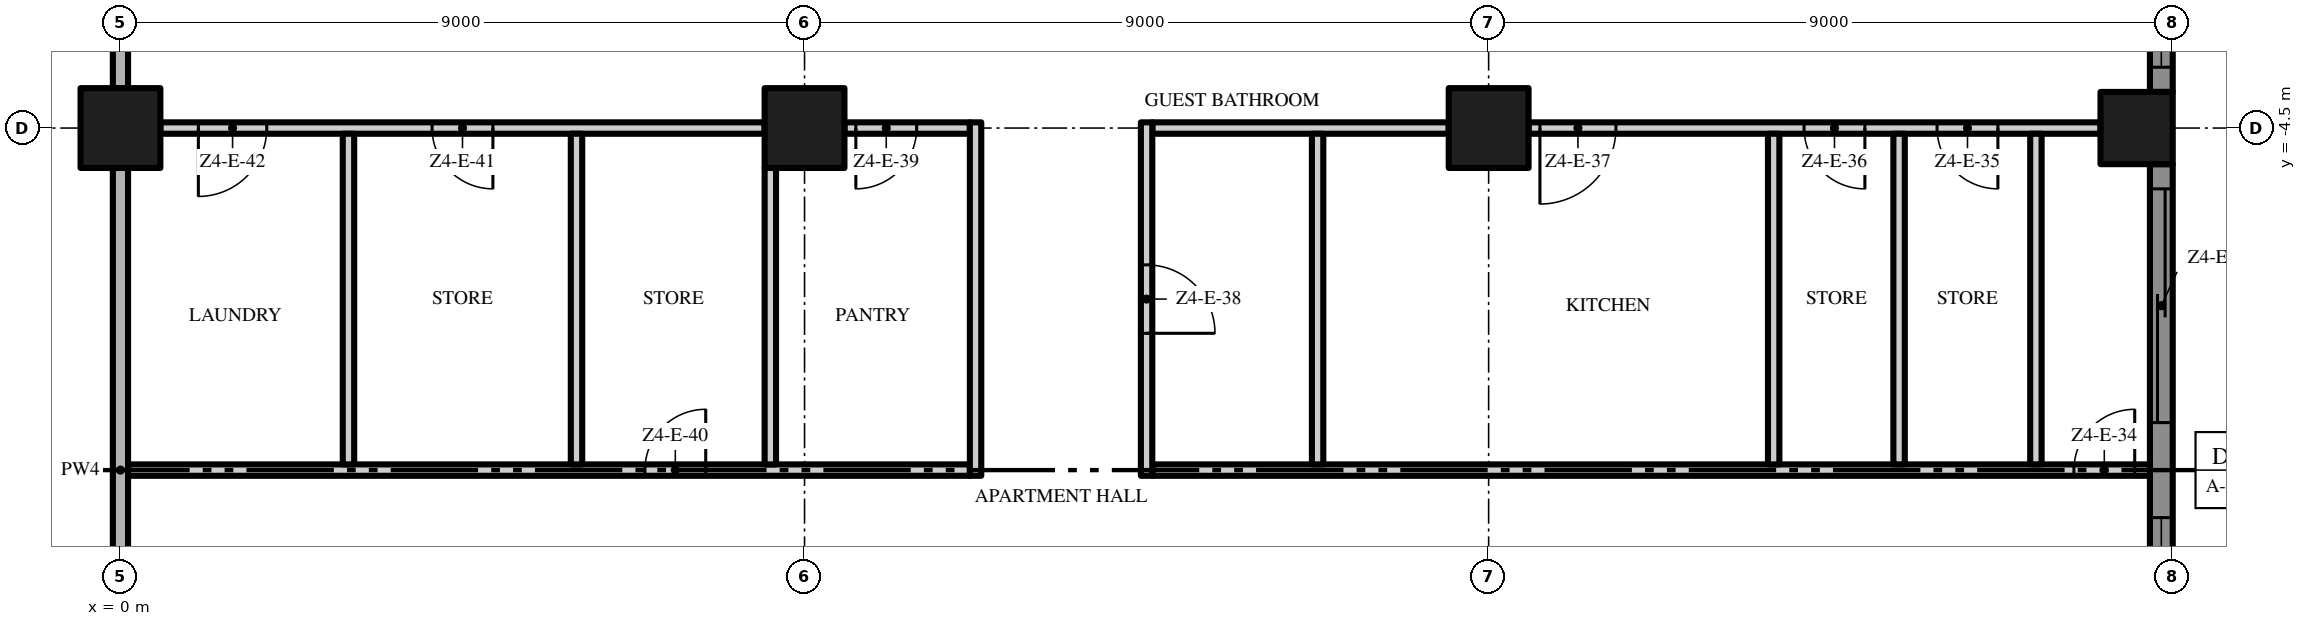
"""IFC4 building model, lengths in metres.
Left out: names, types, materials, properties, quantities, classifications, styles, units other than length and angle.
Written with IfcOpenShell. Run it as: python <this file> out.ifc"""

import sys

from ifc_helpers import new_model, si_unit, direction, frame, frame_2d, origin, origin_2d, place, context, subcontext, project, spatial, polyline, rectangle, outline, extrude, element, fill, save


model = new_model("IFC4")
c1 = context("Model", 3, precision=1e-05, world=origin(), true_north=direction((0.0, 1.0)))
c2 = subcontext(c1, "Body", "Model", "MODEL_VIEW")
j1 = project(units=[si_unit("LENGTHUNIT", "METRE"), si_unit("PLANEANGLEUNIT", "RADIAN")], contexts=[c1])
p1 = place(None, origin())
s1 = spatial("IfcSite", under=j1, at=p1, CompositionType="ELEMENT")
p2 = place(p1, origin())
s2 = spatial("IfcBuilding", under=s1, at=p2, CompositionType="ELEMENT")
p3 = place(p2, frame((0.0, 0.0, 226.2)))
s3 = spatial("IfcBuildingStorey", under=s2, at=p3, CompositionType="ELEMENT", Elevation=226.2)
for number, where, z_axis, x_axis in (
    (1, (0.0, -4.5, 0.0), (0.0, 0.0, 1.0), (1.0, 0.0, 0.0)),
    (2, (18.0, -4.5, 0.0), (0.0, 0.0, 1.0), (1.0, 0.0, 0.0)),
):
    element("IfcColumn", number, at=place(p3, frame(where, z_axis=z_axis, x_axis=x_axis)), inside=s3, PredefinedType="COLUMN", context=c2, shape_type="SweptSolid", body=[
        extrude(rectangle(XDim=1.05, YDim=1.05, at=origin_2d()), origin(), (0.0, 0.0, 1.0), 3.5),
    ])
p4 = place(p3, frame((26.525, -4.5, 0.0), z_axis=(0.0, 0.0, 1.0), x_axis=(1.0, 0.0, 0.0)))
e3 = element("IfcColumn", 3, at=p4, inside=s3, PredefinedType="COLUMN", context=c2, shape_type="SweptSolid", body=[
    extrude(rectangle(XDim=0.95, YDim=0.95, at=origin_2d()), origin(), (0.0, 0.0, 1.0), 3.5),
])
p5 = place(p3, frame((9.0, -4.5, 0.0), z_axis=(0.0, 0.0, 1.0), x_axis=(1.0, 0.0, 0.0)))
e4 = element("IfcColumn", 4, at=p5, inside=s3, PredefinedType="COLUMN", context=c2, shape_type="SweptSolid", body=[
    extrude(rectangle(XDim=1.05, YDim=1.05, at=origin_2d()), origin(), (0.0, 0.0, 1.0), 3.5),
])
p6 = place(p3, frame((26.85, -4.975, 0.0), z_axis=(0.0, 0.0, 1.0), x_axis=(0.0, -1.0, 0.0)))
e5 = element("IfcWall", 5, at=p6, inside=s3, PredefinedType="SOLIDWALL", context=c2, shape_type="SweptSolid", body=[
    extrude(rectangle(XDim=8.05, YDim=0.3, at=frame_2d((4.025, 0.0))), origin(), (0.0, 0.0, 1.0), 3.5),
])
p7 = place(p6, frame((4.65, 0.0, 0.45)))
e6 = element("IfcOpeningElement", 6, at=p7, cuts=e5, PredefinedType="OPENING", context=c2, shape_type="SweptSolid", body=[
    extrude(rectangle(XDim=3.075, YDim=2.65, at=frame_2d((1.538, 1.325))), frame((0.0, 0.16, 0.0), z_axis=(0.0, -1.0, 0.0), x_axis=(1.0, 0.0, 0.0)), (0.0, 0.0, 1.0), 0.32),
])
p8 = place(p6, frame((0.325, 0.0, 0.0)))
e7 = element("IfcOpeningElement", 7, at=p8, cuts=e5, PredefinedType="OPENING", context=c2, shape_type="SweptSolid", body=[
    extrude(rectangle(XDim=3.075, YDim=2.4, at=frame_2d((1.538, 1.2))), frame((0.0, 0.16, 0.0), z_axis=(0.0, -1.0, 0.0), x_axis=(1.0, 0.0, 0.0)), (0.0, 0.0, 1.0), 0.32),
])
p9 = place(p3, frame((26.85, 4.025, 0.0), z_axis=(0.0, 0.0, 1.0), x_axis=(0.0, -1.0, 0.0)))
e8 = element("IfcWall", 8, at=p9, inside=s3, PredefinedType="SOLIDWALL", context=c2, shape_type="SweptSolid", body=[
    extrude(rectangle(XDim=8.05, YDim=0.3, at=frame_2d((4.025, 0.0))), origin(), (0.0, 0.0, 1.0), 3.5),
])
p10 = place(p9, frame((4.65, 0.0, 0.45)))
e9 = element("IfcOpeningElement", 9, at=p10, cuts=e8, PredefinedType="OPENING", context=c2, shape_type="SweptSolid", body=[
    extrude(rectangle(XDim=3.075, YDim=2.65, at=frame_2d((1.538, 1.325))), frame((0.0, 0.16, 0.0), z_axis=(0.0, -1.0, 0.0), x_axis=(1.0, 0.0, 0.0)), (0.0, 0.0, 1.0), 0.32),
])
p11 = place(p9, frame((0.325, 0.0, 0.45)))
e10 = element("IfcOpeningElement", 10, at=p11, cuts=e8, PredefinedType="OPENING", context=c2, shape_type="SweptSolid", body=[
    extrude(rectangle(XDim=3.075, YDim=2.65, at=frame_2d((1.538, 1.325))), frame((0.0, 0.16, 0.0), z_axis=(0.0, -1.0, 0.0), x_axis=(1.0, 0.0, 0.0)), (0.0, 0.0, 1.0), 0.32),
])
p12 = place(p3, origin())
e11 = element("IfcWall", 11, at=p12, inside=s3, PredefinedType="USERDEFINED", context=c2, shape_type="SweptSolid", body=[
    extrude(outline(polyline([(28.8, -18.0), (28.095, -16.5), (27.659, -15.0), (27.6, -14.25), (27.659, -13.5), (28.095, -12.0), (28.8, -10.5), (29.505, -9.0), (29.941, -7.5), (30.0, -6.75), (29.941, -6.0), (29.505, -4.5), (28.8, -3.0), (28.095, -1.5), (27.659, 0.0), (27.6, 0.75), (27.659, 1.5), (28.095, 3.0), (28.8, 4.5), (29.505, 6.0), (29.941, 7.5), (30.0, 8.25), (29.941, 9.0), (29.505, 10.5), (28.8, 12.0), (28.095, 13.5), (27.659, 15.0), (27.6, 15.75), (27.659, 16.5), (28.095, 18.0), (27.855, 18.07), (27.411, 16.545), (27.349, 15.75), (27.411, 14.955), (27.86, 13.411), (28.574, 11.894), (29.271, 10.411), (29.694, 8.955), (29.749, 8.25), (29.694, 7.545), (29.271, 6.089), (28.574, 4.606), (27.86, 3.089), (27.411, 1.545), (27.349, 0.75), (27.411, -0.045), (27.86, -1.589), (28.574, -3.106), (29.271, -4.589), (29.694, -6.045), (29.749, -6.75), (29.694, -7.455), (29.271, -8.911), (28.574, -10.394), (27.86, -11.911), (27.411, -13.455), (27.349, -14.25), (27.411, -15.045), (27.86, -16.589), (28.574, -18.106), (28.8, -18.0)])), origin(), (0.0, 0.0, 1.0), 0.9),
])
p13 = place(p3, frame((0.1, -9.0, 0.0), z_axis=(0.0, 0.0, 1.0), x_axis=(1.0, 0.0, 0.0)))
e12 = element("IfcWall", 12, at=p13, inside=s3, PredefinedType="PARTITIONING", context=c2, shape_type="SweptSolid", body=[
    extrude(rectangle(XDim=11.075, YDim=0.15, at=frame_2d((5.537, 0.0))), origin(), (0.0, 0.0, 1.0), 3.5),
])
p14 = place(p13, frame((6.8, 0.0, 0.0)))
e13 = element("IfcOpeningElement", 13, at=p14, cuts=e12, PredefinedType="OPENING", context=c2, shape_type="SweptSolid", body=[
    extrude(rectangle(XDim=0.8, YDim=2.0, at=frame_2d((0.4, 1.0))), frame((0.0, 0.085, 0.0), z_axis=(0.0, -1.0, 0.0), x_axis=(1.0, 0.0, 0.0)), (0.0, 0.0, 1.0), 0.17),
])
p15 = place(p3, frame((13.575, -9.0, 0.0), z_axis=(0.0, 0.0, 1.0), x_axis=(1.0, 0.0, 0.0)))
e14 = element("IfcWall", 14, at=p15, inside=s3, PredefinedType="PARTITIONING", context=c2, shape_type="SweptSolid", body=[
    extrude(rectangle(XDim=13.125, YDim=0.15, at=frame_2d((6.562, 0.0))), origin(), (0.0, 0.0, 1.0), 3.5),
])
p16 = place(p15, frame((12.125, 0.0, 0.0)))
e15 = element("IfcOpeningElement", 15, at=p16, cuts=e14, PredefinedType="OPENING", context=c2, shape_type="SweptSolid", body=[
    extrude(rectangle(XDim=0.8, YDim=2.0, at=frame_2d((0.4, 1.0))), frame((0.0, 0.085, 0.0), z_axis=(0.0, -1.0, 0.0), x_axis=(1.0, 0.0, 0.0)), (0.0, 0.0, 1.0), 0.17),
])
p17 = place(p3, frame((8.475, -4.5, 0.0), z_axis=(0.0, 0.0, 1.0), x_axis=(-1.0, 0.0, 0.0)))
e16 = element("IfcWall", 16, at=p17, inside=s3, PredefinedType="PARTITIONING", context=c2, shape_type="SweptSolid", body=[
    extrude(rectangle(XDim=7.95, YDim=0.15, at=frame_2d((3.975, 0.0))), origin(), (0.0, 0.0, 1.0), 3.5),
])
p18 = place(p17, frame((3.575, 0.0, 0.0)))
e17 = element("IfcOpeningElement", 17, at=p18, cuts=e16, PredefinedType="OPENING", context=c2, shape_type="SweptSolid", body=[
    extrude(rectangle(XDim=0.8, YDim=2.0, at=frame_2d((0.4, 1.0))), frame((0.0, 0.085, 0.0), z_axis=(0.0, -1.0, 0.0), x_axis=(1.0, 0.0, 0.0)), (0.0, 0.0, 1.0), 0.17),
])
p19 = place(p17, frame((6.55, 0.0, 0.0)))
e18 = element("IfcOpeningElement", 18, at=p19, cuts=e16, PredefinedType="OPENING", context=c2, shape_type="SweptSolid", body=[
    extrude(rectangle(XDim=0.9, YDim=2.1, at=frame_2d((0.45, 1.05))), frame((0.0, 0.085, 0.0), z_axis=(0.0, -1.0, 0.0), x_axis=(1.0, 0.0, 0.0)), (0.0, 0.0, 1.0), 0.17),
])
p20 = place(p3, frame((11.175, -4.5, 0.0), z_axis=(0.0, 0.0, 1.0), x_axis=(-1.0, 0.0, 0.0)))
e19 = element("IfcWall", 19, at=p20, inside=s3, PredefinedType="PARTITIONING", context=c2, shape_type="SweptSolid", body=[
    extrude(rectangle(XDim=1.65, YDim=0.15, at=frame_2d((0.825, 0.0))), origin(), (0.0, 0.0, 1.0), 3.5),
])
p21 = place(p20, frame((0.7, 0.0, 0.0)))
e20 = element("IfcOpeningElement", 20, at=p21, cuts=e19, PredefinedType="OPENING", context=c2, shape_type="SweptSolid", body=[
    extrude(rectangle(XDim=0.8, YDim=2.0, at=frame_2d((0.4, 1.0))), frame((0.0, 0.085, 0.0), z_axis=(0.0, -1.0, 0.0), x_axis=(1.0, 0.0, 0.0)), (0.0, 0.0, 1.0), 0.17),
])
p22 = place(p3, frame((13.575, -4.5, 0.0), z_axis=(0.0, 0.0, 1.0), x_axis=(1.0, 0.0, 0.0)))
e21 = element("IfcWall", 21, at=p22, inside=s3, PredefinedType="PARTITIONING", context=c2, shape_type="SweptSolid", body=[
    extrude(rectangle(XDim=3.9, YDim=0.15, at=frame_2d((1.95, 0.0))), origin(), (0.0, 0.0, 1.0), 3.5),
])
p23 = place(p3, frame((26.05, -4.5, 0.0), z_axis=(0.0, 0.0, 1.0), x_axis=(-1.0, 0.0, 0.0)))
e22 = element("IfcWall", 22, at=p23, inside=s3, PredefinedType="PARTITIONING", context=c2, shape_type="SweptSolid", body=[
    extrude(rectangle(XDim=7.525, YDim=0.15, at=frame_2d((3.763, 0.0))), origin(), (0.0, 0.0, 1.0), 3.5),
])
p24 = place(p23, frame((1.35, 0.0, 0.0)))
e23 = element("IfcOpeningElement", 23, at=p24, cuts=e22, PredefinedType="OPENING", context=c2, shape_type="SweptSolid", body=[
    extrude(rectangle(XDim=0.8, YDim=2.0, at=frame_2d((0.4, 1.0))), frame((0.0, 0.085, 0.0), z_axis=(0.0, -1.0, 0.0), x_axis=(1.0, 0.0, 0.0)), (0.0, 0.0, 1.0), 0.17),
])
p25 = place(p23, frame((3.1, 0.0, 0.0)))
e24 = element("IfcOpeningElement", 24, at=p25, cuts=e22, PredefinedType="OPENING", context=c2, shape_type="SweptSolid", body=[
    extrude(rectangle(XDim=0.8, YDim=2.0, at=frame_2d((0.4, 1.0))), frame((0.0, 0.085, 0.0), z_axis=(0.0, -1.0, 0.0), x_axis=(1.0, 0.0, 0.0)), (0.0, 0.0, 1.0), 0.17),
])
p26 = place(p23, frame((6.375, 0.0, 0.0)))
e25 = element("IfcOpeningElement", 25, at=p26, cuts=e22, PredefinedType="OPENING", context=c2, shape_type="SweptSolid", body=[
    extrude(rectangle(XDim=1.0, YDim=2.4, at=frame_2d((0.5, 1.2))), frame((0.0, 0.085, 0.0), z_axis=(0.0, -1.0, 0.0), x_axis=(1.0, 0.0, 0.0)), (0.0, 0.0, 1.0), 0.17),
])
p27 = place(p3, frame((0.0, -12.975, 0.0), z_axis=(0.0, 0.0, 1.0), x_axis=(0.0, 1.0, 0.0)))
e26 = element("IfcWall", 26, at=p27, inside=s3, PredefinedType="PARTITIONING", context=c2, shape_type="SweptSolid", body=[
    extrude(rectangle(XDim=7.95, YDim=0.2, at=frame_2d((3.975, 0.0))), origin(), (0.0, 0.0, 1.0), 3.5),
])
p28 = place(p3, frame((0.0, -3.975, 0.0), z_axis=(0.0, 0.0, 1.0), x_axis=(0.0, 1.0, 0.0)))
e27 = element("IfcWall", 27, at=p28, inside=s3, PredefinedType="PARTITIONING", context=c2, shape_type="SweptSolid", body=[
    extrude(rectangle(XDim=4.075, YDim=0.2, at=frame_2d((2.038, 0.0))), origin(), (0.0, 0.0, 1.0), 3.5),
])
for number, where, z_axis, x_axis in (
    (28, (3.0, -8.925, 0.0), (0.0, 0.0, 1.0), (0.0, 1.0, 0.0)),
    (29, (6.0, -8.925, 0.0), (0.0, 0.0, 1.0), (0.0, 1.0, 0.0)),
):
    element("IfcWall", number, at=place(p3, frame(where, z_axis=z_axis, x_axis=x_axis)), inside=s3, PredefinedType="PARTITIONING", context=c2, shape_type="SweptSolid", body=[
        extrude(rectangle(XDim=4.35, YDim=0.15, at=frame_2d((2.175, 0.0))), origin(), (0.0, 0.0, 1.0), 3.5),
    ])
p29 = place(p3, frame((8.55, -8.925, 0.0), z_axis=(0.0, 0.0, 1.0), x_axis=(0.0, 1.0, 0.0)))
e30 = element("IfcWall", 30, at=p29, inside=s3, PredefinedType="PARTITIONING", context=c2, shape_type="SweptSolid", body=[
    extrude(rectangle(XDim=3.9, YDim=0.15, at=frame_2d((1.95, 0.0))), origin(), (0.0, 0.0, 1.0), 3.5),
])
p30 = place(p3, frame((11.25, -9.075, 0.0), z_axis=(0.0, 0.0, 1.0), x_axis=(0.0, 1.0, 0.0)))
e31 = element("IfcWall", 31, at=p30, inside=s3, PredefinedType="PARTITIONING", context=c2, shape_type="SweptSolid", body=[
    extrude(rectangle(XDim=4.65, YDim=0.15, at=frame_2d((2.325, 0.0))), origin(), (0.0, 0.0, 1.0), 3.5),
])
p31 = place(p3, frame((13.5, -4.425, 0.0), z_axis=(0.0, 0.0, 1.0), x_axis=(0.0, -1.0, 0.0)))
e32 = element("IfcWall", 32, at=p31, inside=s3, PredefinedType="PARTITIONING", context=c2, shape_type="SweptSolid", body=[
    extrude(rectangle(XDim=4.65, YDim=0.15, at=frame_2d((2.325, 0.0))), origin(), (0.0, 0.0, 1.0), 3.5),
])
p32 = place(p31, frame((1.875, 0.0, 0.0)))
e33 = element("IfcOpeningElement", 33, at=p32, cuts=e32, PredefinedType="OPENING", context=c2, shape_type="SweptSolid", body=[
    extrude(rectangle(XDim=0.9, YDim=2.1, at=frame_2d((0.45, 1.05))), frame((0.0, 0.085, 0.0), z_axis=(0.0, -1.0, 0.0), x_axis=(1.0, 0.0, 0.0)), (0.0, 0.0, 1.0), 0.17),
])
for number, where, z_axis, x_axis in (
    (34, (15.75, -8.925, 0.0), (0.0, 0.0, 1.0), (0.0, 1.0, 0.0)),
    (35, (21.75, -8.925, 0.0), (0.0, 0.0, 1.0), (0.0, 1.0, 0.0)),
    (36, (23.4, -8.925, 0.0), (0.0, 0.0, 1.0), (0.0, 1.0, 0.0)),
    (37, (25.2, -8.925, 0.0), (0.0, 0.0, 1.0), (0.0, 1.0, 0.0)),
):
    element("IfcWall", number, at=place(p3, frame(where, z_axis=z_axis, x_axis=x_axis)), inside=s3, PredefinedType="PARTITIONING", context=c2, shape_type="SweptSolid", body=[
        extrude(rectangle(XDim=4.35, YDim=0.15, at=frame_2d((2.175, 0.0))), origin(), (0.0, 0.0, 1.0), 3.5),
    ])
p33 = place(p7, origin())
e38 = element("IfcWindow", 38, at=p33, inside=s3, PartitioningType="SINGLE_PANEL", PredefinedType="WINDOW", context=c2, shape_type="SweptSolid", body=[
    extrude(rectangle(XDim=3.075, YDim=2.65, at=frame_2d((1.538, 1.325))), frame((0.0, 0.03, 0.0), z_axis=(0.0, -1.0, 0.0), x_axis=(1.0, 0.0, 0.0)), (0.0, 0.0, 1.0), 0.06),
])
fill(e6, e38)
p34 = place(p8, origin())
e39 = element("IfcDoor", 39, at=p34, inside=s3, OperationType="SINGLE_SWING_LEFT", PredefinedType="DOOR", context=c2, shape_type="SweptSolid", body=[
    extrude(rectangle(XDim=3.075, YDim=2.4, at=frame_2d((1.538, 1.2))), frame((0.0, 0.025, 0.0), z_axis=(0.0, -1.0, 0.0), x_axis=(1.0, 0.0, 0.0)), (0.0, 0.0, 1.0), 0.05),
])
fill(e7, e39)
p35 = place(p10, origin())
e40 = element("IfcWindow", 40, at=p35, inside=s3, PartitioningType="SINGLE_PANEL", PredefinedType="WINDOW", context=c2, shape_type="SweptSolid", body=[
    extrude(rectangle(XDim=3.075, YDim=2.65, at=frame_2d((1.538, 1.325))), frame((0.0, 0.03, 0.0), z_axis=(0.0, -1.0, 0.0), x_axis=(1.0, 0.0, 0.0)), (0.0, 0.0, 1.0), 0.06),
])
fill(e9, e40)
p36 = place(p16, origin())
e41 = element("IfcDoor", 41, at=p36, inside=s3, OperationType="SINGLE_SWING_RIGHT", PredefinedType="DOOR", context=c2, shape_type="SweptSolid", body=[
    extrude(rectangle(XDim=0.8, YDim=2.0, at=frame_2d((0.4, 1.0))), frame((0.0, 0.025, 0.0), z_axis=(0.0, -1.0, 0.0), x_axis=(1.0, 0.0, 0.0)), (0.0, 0.0, 1.0), 0.05),
])
fill(e15, e41)
p37 = place(p24, origin())
e42 = element("IfcDoor", 42, at=p37, inside=s3, OperationType="SINGLE_SWING_LEFT", PredefinedType="DOOR", context=c2, shape_type="SweptSolid", body=[
    extrude(rectangle(XDim=0.8, YDim=2.0, at=frame_2d((0.4, 1.0))), frame((0.0, 0.025, 0.0), z_axis=(0.0, -1.0, 0.0), x_axis=(1.0, 0.0, 0.0)), (0.0, 0.0, 1.0), 0.05),
])
fill(e23, e42)
p38 = place(p25, origin())
e43 = element("IfcDoor", 43, at=p38, inside=s3, OperationType="SINGLE_SWING_LEFT", PredefinedType="DOOR", context=c2, shape_type="SweptSolid", body=[
    extrude(rectangle(XDim=0.8, YDim=2.0, at=frame_2d((0.4, 1.0))), frame((0.0, 0.025, 0.0), z_axis=(0.0, -1.0, 0.0), x_axis=(1.0, 0.0, 0.0)), (0.0, 0.0, 1.0), 0.05),
])
fill(e24, e43)
p39 = place(p26, origin())
e44 = element("IfcDoor", 44, at=p39, inside=s3, OperationType="SINGLE_SWING_RIGHT", PredefinedType="DOOR", context=c2, shape_type="SweptSolid", body=[
    extrude(rectangle(XDim=1.0, YDim=2.4, at=frame_2d((0.5, 1.2))), frame((0.0, 0.025, 0.0), z_axis=(0.0, -1.0, 0.0), x_axis=(1.0, 0.0, 0.0)), (0.0, 0.0, 1.0), 0.05),
])
fill(e25, e44)
p40 = place(p32, origin())
e45 = element("IfcDoor", 45, at=p40, inside=s3, OperationType="SINGLE_SWING_RIGHT", PredefinedType="DOOR", context=c2, shape_type="SweptSolid", body=[
    extrude(rectangle(XDim=0.9, YDim=2.1, at=frame_2d((0.45, 1.05))), frame((0.0, 0.025, 0.0), z_axis=(0.0, -1.0, 0.0), x_axis=(1.0, 0.0, 0.0)), (0.0, 0.0, 1.0), 0.05),
])
fill(e33, e45)
p41 = place(p21, origin())
e46 = element("IfcDoor", 46, at=p41, inside=s3, OperationType="SINGLE_SWING_RIGHT", PredefinedType="DOOR", context=c2, shape_type="SweptSolid", body=[
    extrude(rectangle(XDim=0.8, YDim=2.0, at=frame_2d((0.4, 1.0))), frame((0.0, 0.025, 0.0), z_axis=(0.0, -1.0, 0.0), x_axis=(1.0, 0.0, 0.0)), (0.0, 0.0, 1.0), 0.05),
])
fill(e20, e46)
p42 = place(p14, origin())
e47 = element("IfcDoor", 47, at=p42, inside=s3, OperationType="SINGLE_SWING_RIGHT", PredefinedType="DOOR", context=c2, shape_type="SweptSolid", body=[
    extrude(rectangle(XDim=0.8, YDim=2.0, at=frame_2d((0.4, 1.0))), frame((0.0, 0.025, 0.0), z_axis=(0.0, -1.0, 0.0), x_axis=(1.0, 0.0, 0.0)), (0.0, 0.0, 1.0), 0.05),
])
fill(e13, e47)
p43 = place(p18, origin())
e48 = element("IfcDoor", 48, at=p43, inside=s3, OperationType="SINGLE_SWING_LEFT", PredefinedType="DOOR", context=c2, shape_type="SweptSolid", body=[
    extrude(rectangle(XDim=0.8, YDim=2.0, at=frame_2d((0.4, 1.0))), frame((0.0, 0.025, 0.0), z_axis=(0.0, -1.0, 0.0), x_axis=(1.0, 0.0, 0.0)), (0.0, 0.0, 1.0), 0.05),
])
fill(e17, e48)
p44 = place(p19, origin())
e49 = element("IfcDoor", 49, at=p44, inside=s3, OperationType="SINGLE_SWING_RIGHT", PredefinedType="DOOR", context=c2, shape_type="SweptSolid", body=[
    extrude(rectangle(XDim=0.9, YDim=2.1, at=frame_2d((0.45, 1.05))), frame((0.0, 0.025, 0.0), z_axis=(0.0, -1.0, 0.0), x_axis=(1.0, 0.0, 0.0)), (0.0, 0.0, 1.0), 0.05),
])
fill(e18, e49)
save(model, sys.argv[1])
